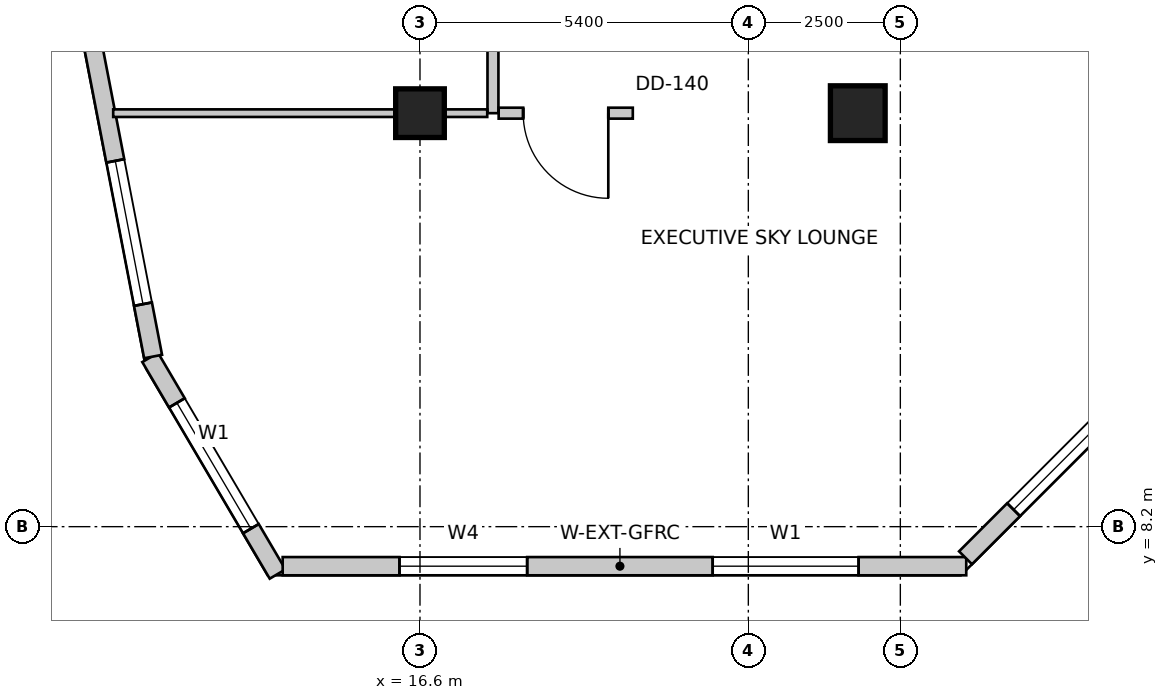
"""IFC4 building model, lengths in metres.
Left out: names, types, materials, properties, quantities, classifications, styles, units other than length and angle.
Written with IfcOpenShell. Run it as: python <this file> out.ifc"""

import sys

from ifc_helpers import new_model, si_unit, direction, frame, frame_2d, origin, origin_2d, place, context, subcontext, project, spatial, rectangle, extrude, source, transform, mapped, element, fill, save


model = new_model("IFC4")
c1 = context("Model", 3, precision=1e-05, world=origin(), true_north=direction((0.0, 1.0)))
c2 = subcontext(c1, "Body", "Model", "MODEL_VIEW")
j1 = project(units=[si_unit("LENGTHUNIT", "METRE"), si_unit("PLANEANGLEUNIT", "RADIAN")], contexts=[c1])
p1 = place(None, origin())
s1 = spatial("IfcSite", under=j1, at=p1, CompositionType="ELEMENT")
p2 = place(p1, origin())
s2 = spatial("IfcBuilding", under=s1, at=p2, CompositionType="ELEMENT")
p3 = place(p2, frame((0.0, 0.0, 135.8)))
s3 = spatial("IfcBuildingStorey", under=s2, at=p3, CompositionType="ELEMENT", Elevation=135.8)
m1 = source(origin(), c2, "Body", "SweptSolid", [
    extrude(rectangle(XDim=0.9, YDim=0.9, at=origin_2d()), origin(), (0.0, 0.0, 1.0), 3.6),
])
p4 = place(p3, frame((23.8, 15.0, 0.0), z_axis=(0.0, 0.0, 1.0), x_axis=(1.0, 0.0, 0.0)))
e1 = element("IfcColumn", 1, at=p4, inside=s3, PredefinedType="COLUMN", context=c2, shape_type="MappedRepresentation", body=[
    mapped(m1, transform((0.0, 0.0, 0.0), scale=1.0)),
])
m2 = source(origin(), c2, "Body", "SweptSolid", [
    extrude(rectangle(XDim=0.8, YDim=0.8, at=origin_2d()), origin(), (0.0, 0.0, 1.0), 3.6),
])
p5 = place(p3, frame((16.6, 15.0, 0.0), z_axis=(0.0, 0.0, 1.0), x_axis=(1.0, 0.0, 0.0)))
e2 = element("IfcColumn", 2, at=p5, inside=s3, PredefinedType="COLUMN", context=c2, shape_type="MappedRepresentation", body=[
    mapped(m2, transform((0.0, 0.0, 0.0), scale=1.0)),
])
p6 = place(p3, frame((12.162, 10.983, 0.0), z_axis=(0.0, 0.0, 1.0), x_axis=(0.506996893234, -0.861947881401, 0.0)))
e3 = element("IfcWall", 3, at=p6, inside=s3, PredefinedType="SOLIDWALL", context=c2, shape_type="SweptSolid", body=[
    extrude(rectangle(XDim=4.133, YDim=0.3, at=frame_2d((2.066, 0.0))), origin(), (0.0, 0.0, 1.0), 3.3),
])
m3 = source(origin(), c2, "Body", "SweptSolid", [
    extrude(rectangle(XDim=2.4, YDim=2.2, at=frame_2d((1.2, 1.1))), frame((0.0, 0.16, 0.0), z_axis=(0.0, -1.0, 0.0), x_axis=(1.0, 0.0, 0.0)), (0.0, 0.0, 1.0), 0.32),
])
p7 = place(p6, frame((0.867, 0.0, 0.85)))
e4 = element("IfcOpeningElement", 4, at=p7, cuts=e3, PredefinedType="OPENING", context=c2, shape_type="MappedRepresentation", body=[
    mapped(m3, transform((0.0, 0.0, 0.0), scale=1.0)),
])
p8 = place(p3, frame((14.342, 7.55, 0.0), z_axis=(0.0, 0.0, 1.0), x_axis=(1.0, 0.0, 0.0)))
e5 = element("IfcWall", 5, at=p8, inside=s3, PredefinedType="SOLIDWALL", context=c2, shape_type="SweptSolid", body=[
    extrude(rectangle(XDim=11.242, YDim=0.3, at=frame_2d((5.621, 0.0))), origin(), (0.0, 0.0, 1.0), 3.3),
])
m4 = source(origin(), c2, "Body", "SweptSolid", [
    extrude(rectangle(XDim=2.1, YDim=2.0, at=frame_2d((1.05, 1.0))), frame((0.0, 0.16, 0.0), z_axis=(0.0, -1.0, 0.0), x_axis=(1.0, 0.0, 0.0)), (0.0, 0.0, 1.0), 0.32),
])
p9 = place(p8, frame((1.921, 0.0, 0.85)))
e6 = element("IfcOpeningElement", 6, at=p9, cuts=e5, PredefinedType="OPENING", context=c2, shape_type="MappedRepresentation", body=[
    mapped(m4, transform((0.0, 0.0, 0.0), scale=1.0)),
])
p10 = place(p8, frame((7.072, 0.0, 0.85)))
e7 = element("IfcOpeningElement", 7, at=p10, cuts=e5, PredefinedType="OPENING", context=c2, shape_type="MappedRepresentation", body=[
    mapped(m3, transform((0.0, 0.0, 0.0), scale=1.0)),
])
p11 = place(p3, frame((25.572, 7.688, 0.0), z_axis=(0.0, 0.0, 1.0), x_axis=(0.70708046583, 0.707133095564, 0.0)))
e8 = element("IfcWall", 8, at=p11, inside=s3, PredefinedType="SOLIDWALL", context=c2, shape_type="SweptSolid", body=[
    extrude(rectangle(XDim=4.639, YDim=0.3, at=frame_2d((2.319, 0.0))), origin(), (0.0, 0.0, 1.0), 3.3),
])
p12 = place(p11, frame((1.119, 0.0, 0.85)))
e9 = element("IfcOpeningElement", 9, at=p12, cuts=e8, PredefinedType="OPENING", context=c2, shape_type="MappedRepresentation", body=[
    mapped(m3, transform((0.0, 0.0, 0.0), scale=1.0)),
])
p13 = place(p3, frame((8.185, 31.834, 0.0), z_axis=(0.0, 0.0, 1.0), x_axis=(0.189707113148, -0.981840725994, 0.0)))
e10 = element("IfcWall", 10, at=p13, inside=s3, PredefinedType="SOLIDWALL", context=c2, shape_type="SweptSolid", body=[
    extrude(rectangle(XDim=21.221, YDim=0.3, at=frame_2d((10.611, 0.0))), origin(), (0.0, 0.0, 1.0), 3.3),
])
m5 = source(origin(), c2, "Body", "SweptSolid", [
    extrude(rectangle(XDim=1.5, YDim=1.8, at=frame_2d((0.75, 0.9))), frame((0.0, 0.16, 0.0), z_axis=(0.0, -1.0, 0.0), x_axis=(1.0, 0.0, 0.0)), (0.0, 0.0, 1.0), 0.32),
])
p14 = place(p13, frame((0.977, 0.0, 0.85)))
e11 = element("IfcOpeningElement", 11, at=p14, cuts=e10, PredefinedType="OPENING", context=c2, shape_type="MappedRepresentation", body=[
    mapped(m5, transform((0.0, 0.0, 0.0), scale=1.0)),
])
p15 = place(p13, frame((4.219, 0.0, 0.85)))
e12 = element("IfcOpeningElement", 12, at=p15, cuts=e10, PredefinedType="OPENING", context=c2, shape_type="MappedRepresentation", body=[
    mapped(m3, transform((0.0, 0.0, 0.0), scale=1.0)),
])
p16 = place(p13, frame((8.371, 0.0, 0.85)))
e13 = element("IfcOpeningElement", 13, at=p16, cuts=e10, PredefinedType="OPENING", context=c2, shape_type="MappedRepresentation", body=[
    mapped(m5, transform((0.0, 0.0, 0.0), scale=1.0)),
])
p17 = place(p13, frame((12.504, 0.0, 0.85)))
e14 = element("IfcOpeningElement", 14, at=p17, cuts=e10, PredefinedType="OPENING", context=c2, shape_type="MappedRepresentation", body=[
    mapped(m3, transform((0.0, 0.0, 0.0), scale=1.0)),
])
p18 = place(p13, frame((17.944, 0.0, 0.85)))
e15 = element("IfcOpeningElement", 15, at=p18, cuts=e10, PredefinedType="OPENING", context=c2, shape_type="MappedRepresentation", body=[
    mapped(m3, transform((0.0, 0.0, 0.0), scale=1.0)),
])
p19 = place(p3, frame((17.8, 15.0, 0.0), z_axis=(0.0, 0.0, 1.0), x_axis=(0.0, 1.0, 0.0)))
e16 = element("IfcWall", 16, at=p19, inside=s3, PredefinedType="PARTITIONING", context=c2, shape_type="SweptSolid", body=[
    extrude(rectangle(XDim=8.838, YDim=0.18, at=frame_2d((4.419, 0.0))), origin(), (0.0, 0.0, 1.0), 2.442),
])
m6 = source(origin(), c2, "Body", "SweptSolid", [
    extrude(rectangle(XDim=0.9, YDim=2.15, at=frame_2d((0.45, 1.075))), frame((0.0, 0.1, 0.0), z_axis=(0.0, -1.0, 0.0), x_axis=(1.0, 0.0, 0.0)), (0.0, 0.0, 1.0), 0.2),
])
p20 = place(p19, frame((3.908, 0.0, 0.0)))
e17 = element("IfcOpeningElement", 17, at=p20, cuts=e16, PredefinedType="OPENING", context=c2, shape_type="MappedRepresentation", body=[
    mapped(m6, transform((0.0, 0.0, 0.0), scale=1.0)),
])
p21 = place(p3, frame((20.1, 15.0, 0.0), z_axis=(0.0, 0.0, 1.0), x_axis=(-1.0, 0.0, 0.0)))
e18 = element("IfcWall", 18, at=p21, inside=s3, PredefinedType="PARTITIONING", context=c2, shape_type="SweptSolid", body=[
    extrude(rectangle(XDim=2.206, YDim=0.18, at=frame_2d((1.103, 0.0))), origin(), (0.0, 0.0, 1.0), 2.442),
])
m7 = source(origin(), c2, "Body", "SweptSolid", [
    extrude(rectangle(XDim=1.4, YDim=2.15, at=frame_2d((0.7, 1.075))), frame((0.0, 0.1, 0.0), z_axis=(0.0, -1.0, 0.0), x_axis=(1.0, 0.0, 0.0)), (0.0, 0.0, 1.0), 0.2),
])
p22 = place(p21, frame((0.403, 0.0, 0.0)))
e19 = element("IfcOpeningElement", 19, at=p22, cuts=e18, PredefinedType="OPENING", context=c2, shape_type="MappedRepresentation", body=[
    mapped(m7, transform((0.0, 0.0, 0.0), scale=1.0)),
])
p23 = place(p3, frame((17.706, 15.0, 0.0), z_axis=(0.0, 0.0, 1.0), x_axis=(-1.0, 0.0, 0.0)))
e20 = element("IfcWall", 20, at=p23, inside=s3, PredefinedType="PARTITIONING", context=c2, shape_type="SweptSolid", body=[
    extrude(rectangle(XDim=6.152, YDim=0.125, at=frame_2d((3.076, 0.0))), origin(), (0.0, 0.0, 1.0), 2.442),
])
m8 = source(origin(), c2, "Body", "SweptSolid", [
    extrude(rectangle(XDim=2.4, YDim=2.2, at=frame_2d((1.2, 1.1))), frame((0.0, -0.015, 0.0), z_axis=(0.0, -1.0, 0.0), x_axis=(1.0, 0.0, 0.0)), (0.0, 0.0, 1.0), 0.06),
])
p24 = place(p7, origin())
e21 = element("IfcWindow", 21, at=p24, inside=s3, PartitioningType="SINGLE_PANEL", PredefinedType="WINDOW", context=c2, shape_type="MappedRepresentation", body=[
    mapped(m8, transform((0.0, 0.0, 0.0), scale=1.0)),
])
fill(e4, e21)
m9 = source(origin(), c2, "Body", "SweptSolid", [
    extrude(rectangle(XDim=2.1, YDim=2.0, at=frame_2d((1.05, 1.0))), frame((0.0, -0.015, 0.0), z_axis=(0.0, -1.0, 0.0), x_axis=(1.0, 0.0, 0.0)), (0.0, 0.0, 1.0), 0.06),
])
p25 = place(p9, origin())
e22 = element("IfcWindow", 22, at=p25, inside=s3, PartitioningType="SINGLE_PANEL", PredefinedType="WINDOW", context=c2, shape_type="MappedRepresentation", body=[
    mapped(m9, transform((0.0, 0.0, 0.0), scale=1.0)),
])
fill(e6, e22)
p26 = place(p10, origin())
e23 = element("IfcWindow", 23, at=p26, inside=s3, PartitioningType="SINGLE_PANEL", PredefinedType="WINDOW", context=c2, shape_type="MappedRepresentation", body=[
    mapped(m8, transform((0.0, 0.0, 0.0), scale=1.0)),
])
fill(e7, e23)
p27 = place(p12, origin())
e24 = element("IfcWindow", 24, at=p27, inside=s3, PartitioningType="SINGLE_PANEL", PredefinedType="WINDOW", context=c2, shape_type="MappedRepresentation", body=[
    mapped(m8, transform((0.0, 0.0, 0.0), scale=1.0)),
])
fill(e9, e24)
p28 = place(p18, origin())
e25 = element("IfcWindow", 25, at=p28, inside=s3, PartitioningType="SINGLE_PANEL", PredefinedType="WINDOW", context=c2, shape_type="MappedRepresentation", body=[
    mapped(m8, transform((0.0, 0.0, 0.0), scale=1.0)),
])
fill(e15, e25)
m10 = source(origin(), c2, "Body", "SweptSolid", [
    extrude(rectangle(XDim=1.4, YDim=2.15, at=frame_2d((0.7, 1.075))), frame((0.0, 0.025, 0.0), z_axis=(0.0, -1.0, 0.0), x_axis=(1.0, 0.0, 0.0)), (0.0, 0.0, 1.0), 0.05),
])
p29 = place(p22, origin())
e26 = element("IfcDoor", 26, at=p29, inside=s3, OperationType="SINGLE_SWING_LEFT", PredefinedType="DOOR", context=c2, shape_type="MappedRepresentation", body=[
    mapped(m10, transform((0.0, 0.0, 0.0), scale=1.0)),
])
fill(e19, e26)
save(model, sys.argv[1])
